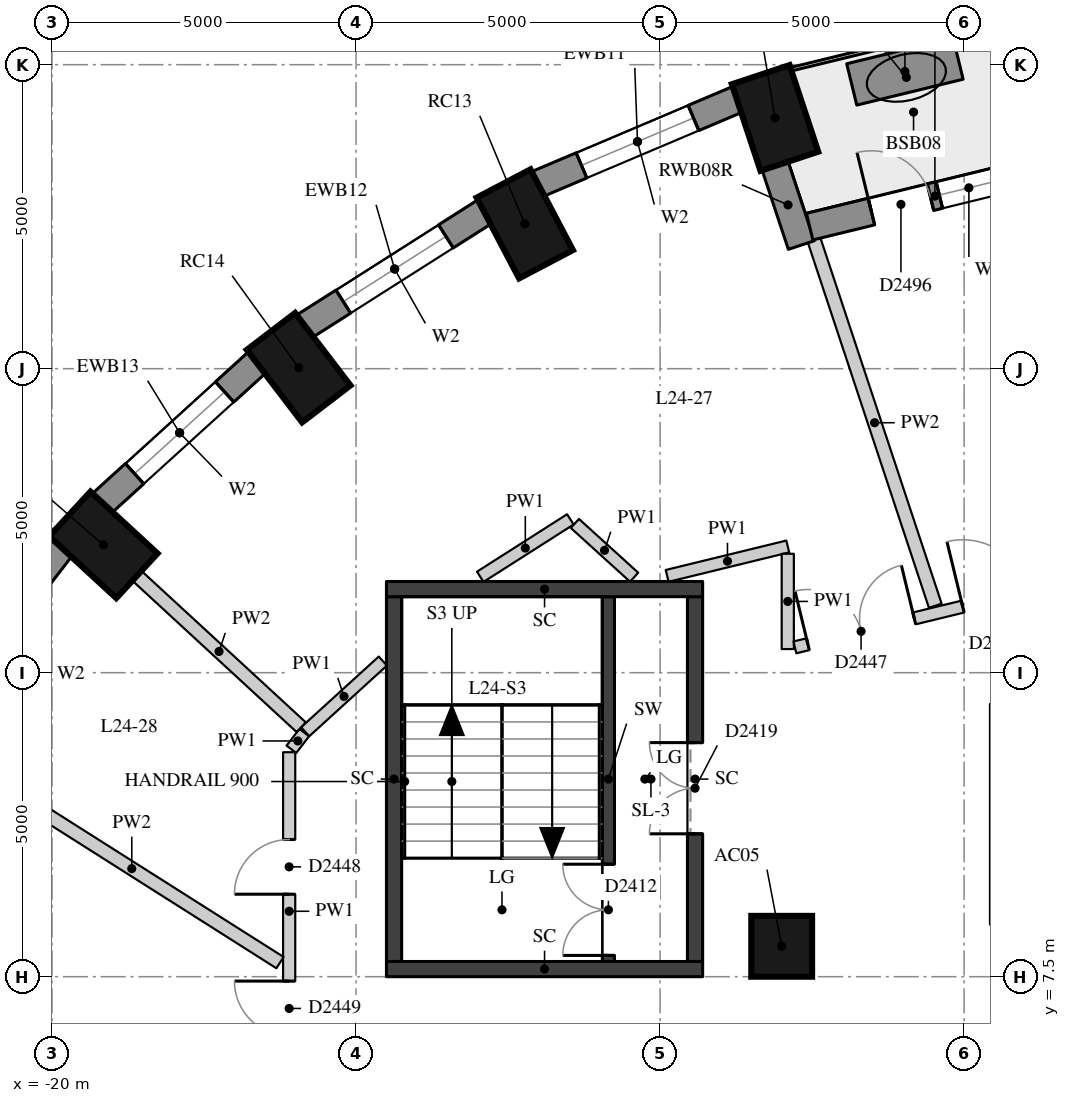
"""IFC4 building model, lengths in metres.
Left out: names, types, materials, properties, quantities, classifications, styles, units other than length and angle.
Written with IfcOpenShell. Run it as: python <this file> out.ifc"""

import sys

from ifc_helpers import new_model, si_unit, direction, frame, frame_2d, origin, origin_2d, place, context, subcontext, project, spatial, rectangle, extrude, element, fill, save


model = new_model("IFC4")
c1 = context("Model", 3, precision=1e-05, world=origin(), true_north=direction((0.0, 1.0)))
c2 = subcontext(c1, "Body", "Model", "MODEL_VIEW")
j1 = project(units=[si_unit("LENGTHUNIT", "METRE"), si_unit("PLANEANGLEUNIT", "RADIAN")], contexts=[c1])
p1 = place(None, origin())
s1 = spatial("IfcSite", under=j1, at=p1, CompositionType="ELEMENT")
p2 = place(p1, origin())
s2 = spatial("IfcBuilding", under=s1, at=p2, CompositionType="ELEMENT")
p3 = place(p2, frame((0.0, 0.0, 88.9)))
s3 = spatial("IfcBuildingStorey", under=s2, at=p3, CompositionType="ELEMENT", Elevation=88.9)
for number, where, z_axis, x_axis in (
    (1, (-8.11, 21.624, 0.0), (0.0, 0.0, 1.0), (-0.315, 0.949, 0.0)),
    (2, (-12.225, 19.882, 0.0), (0.0, 0.0, 1.0), (-0.465, 0.885, 0.0)),
    (3, (-15.945, 17.517, 0.0), (0.0, 0.0, 1.0), (-0.607, 0.795, 0.0)),
    (4, (-19.156, 14.602, 0.0), (0.0, 0.0, 1.0), (-0.735, 0.678, 0.0)),
):
    element("IfcColumn", number, at=place(p3, frame(where, z_axis=z_axis, x_axis=x_axis)), inside=s3, PredefinedType="COLUMN", context=c2, shape_type="SweptSolid", body=[
        extrude(rectangle(XDim=1.5, YDim=1.0, at=origin_2d()), origin(), (0.0, 0.0, 1.0), 3.3),
    ])
p4 = place(p3, frame((-8.0, 8.0, 0.0), z_axis=(0.0, 0.0, 1.0), x_axis=(1.0, 0.0, 0.0)))
e5 = element("IfcColumn", 5, at=p4, inside=s3, PredefinedType="COLUMN", context=c2, shape_type="SweptSolid", body=[
    extrude(rectangle(XDim=1.0, YDim=1.0, at=origin_2d()), origin(), (0.0, 0.0, 1.0), 3.3),
])
p5 = place(p3, frame((-8.718, 21.934, 0.0), z_axis=(0.0, 0.0, 1.0), x_axis=(-0.920879975612, -0.389846213932, 0.0)))
e6 = element("IfcWall", 6, at=p5, inside=s3, PredefinedType="SOLIDWALL", context=c2, shape_type="SweptSolid", body=[
    extrude(rectangle(XDim=3.592, YDim=0.45, at=frame_2d((1.796, 0.0))), origin(), (0.0, 0.0, 1.0), 3.02),
])
p6 = place(p5, frame((0.796, 0.0, 0.4)))
e7 = element("IfcOpeningElement", 7, at=p6, cuts=e6, PredefinedType="OPENING", context=c2, shape_type="SweptSolid", body=[
    extrude(rectangle(XDim=2.0, YDim=1.75, at=frame_2d((1.0, 0.875))), frame((0.0, 0.235, 0.0), z_axis=(0.0, -1.0, 0.0), x_axis=(1.0, 0.0, 0.0)), (0.0, 0.0, 1.0), 0.47),
])
p7 = place(p3, frame((-12.875, 20.087, 0.0), z_axis=(0.0, 0.0, 1.0), x_axis=(-0.843860651879, -0.536562391722, 0.0)))
e8 = element("IfcWall", 8, at=p7, inside=s3, PredefinedType="SOLIDWALL", context=c2, shape_type="SweptSolid", body=[
    extrude(rectangle(XDim=3.532, YDim=0.45, at=frame_2d((1.766, 0.0))), origin(), (0.0, 0.0, 1.0), 3.02),
])
p8 = place(p7, frame((0.766, 0.0, 0.4)))
e9 = element("IfcOpeningElement", 9, at=p8, cuts=e8, PredefinedType="OPENING", context=c2, shape_type="SweptSolid", body=[
    extrude(rectangle(XDim=2.0, YDim=1.75, at=frame_2d((1.0, 0.875))), frame((0.0, 0.235, 0.0), z_axis=(0.0, -1.0, 0.0), x_axis=(1.0, 0.0, 0.0)), (0.0, 0.0, 1.0), 0.47),
])
p9 = place(p3, frame((-16.62, 17.61, 0.0), z_axis=(0.0, 0.0, 1.0), x_axis=(-0.74032902847, -0.672244694739, 0.0)))
e10 = element("IfcWall", 10, at=p9, inside=s3, PredefinedType="SOLIDWALL", context=c2, shape_type="SweptSolid", body=[
    extrude(rectangle(XDim=3.464, YDim=0.45, at=frame_2d((1.732, 0.0))), origin(), (0.0, 0.0, 1.0), 3.02),
])
p10 = place(p9, frame((0.732, 0.0, 0.4)))
e11 = element("IfcOpeningElement", 11, at=p10, cuts=e10, PredefinedType="OPENING", context=c2, shape_type="SweptSolid", body=[
    extrude(rectangle(XDim=2.0, YDim=1.75, at=frame_2d((1.0, 0.875))), frame((0.0, 0.235, 0.0), z_axis=(0.0, -1.0, 0.0), x_axis=(1.0, 0.0, 0.0)), (0.0, 0.0, 1.0), 0.47),
])
p11 = place(p3, frame((-19.835, 14.575, 0.0), z_axis=(0.0, 0.0, 1.0), x_axis=(-0.610693945156, -0.791866721961, 0.0)))
e12 = element("IfcWall", 12, at=p11, inside=s3, PredefinedType="SOLIDWALL", context=c2, shape_type="SweptSolid", body=[
    extrude(rectangle(XDim=3.395, YDim=0.45, at=frame_2d((1.697, 0.0))), origin(), (0.0, 0.0, 1.0), 3.02),
])
p12 = place(p11, frame((0.697, 0.0, 0.4)))
e13 = element("IfcOpeningElement", 13, at=p12, cuts=e12, PredefinedType="OPENING", context=c2, shape_type="SweptSolid", body=[
    extrude(rectangle(XDim=2.0, YDim=1.75, at=frame_2d((1.0, 0.875))), frame((0.0, 0.235, 0.0), z_axis=(0.0, -1.0, 0.0), x_axis=(1.0, 0.0, 0.0)), (0.0, 0.0, 1.0), 0.47),
])
p13 = place(p3, frame((-8.114, 20.853, 0.0), z_axis=(0.0, 0.0, 1.0), x_axis=(0.314488854508, -0.949261165534, 0.0)))
e14 = element("IfcWall", 14, at=p13, inside=s3, PredefinedType="SOLIDWALL", context=c2, shape_type="SweptSolid", body=[
    extrude(rectangle(XDim=1.39, YDim=0.45, at=frame_2d((0.695, 0.0))), origin(), (0.0, 0.0, 1.0), 3.02),
])
p14 = place(p3, frame((-3.42, 20.841, 0.0), z_axis=(0.0, 0.0, 1.0), x_axis=(-0.971511611373, -0.23699195971, 0.0)))
e15 = element("IfcWall", 15, at=p14, inside=s3, PredefinedType="SOLIDWALL", context=c2, shape_type="SweptSolid", body=[
    extrude(rectangle(XDim=4.241, YDim=0.45, at=frame_2d((2.121, 0.0))), origin(), (0.0, 0.0, 1.0), 3.02),
])
p15 = place(p14, frame((1.045, 0.0, 0.4)))
e16 = element("IfcOpeningElement", 16, at=p15, cuts=e15, PredefinedType="OPENING", context=c2, shape_type="SweptSolid", body=[
    extrude(rectangle(XDim=1.0, YDim=1.75, at=frame_2d((0.5, 0.875))), frame((0.0, 0.235, 0.0), z_axis=(0.0, -1.0, 0.0), x_axis=(1.0, 0.0, 0.0)), (0.0, 0.0, 1.0), 0.47),
])
p16 = place(p14, frame((2.196, 0.0, 0.0)))
e17 = element("IfcOpeningElement", 17, at=p16, cuts=e15, PredefinedType="OPENING", context=c2, shape_type="SweptSolid", body=[
    extrude(rectangle(XDim=1.0, YDim=2.15, at=frame_2d((0.5, 1.075))), frame((0.0, 0.235, 0.0), z_axis=(0.0, -1.0, 0.0), x_axis=(1.0, 0.0, 0.0)), (0.0, 0.0, 1.0), 0.47),
])
p17 = place(p3, frame((-5.099, 22.601, 0.0), z_axis=(0.0, 0.0, 1.0), x_axis=(-0.971654974133, -0.23640349245, 0.0)))
e18 = element("IfcWall", 18, at=p17, inside=s3, PredefinedType="USERDEFINED", context=c2, shape_type="SweptSolid", body=[
    extrude(rectangle(XDim=1.8, YDim=0.7, at=frame_2d((0.9, 0.0))), origin(), (0.0, 0.0, 1.0), 0.75),
])
p18 = place(p3, frame((-10.85, 7.75, 0.0), z_axis=(0.0, 0.0, 1.0), x_axis=(0.0, 1.0, 0.0)))
e19 = element("IfcWall", 19, at=p18, inside=s3, PredefinedType="SHEAR", context=c2, shape_type="SweptSolid", body=[
    extrude(rectangle(XDim=6.0, YDim=0.2, at=frame_2d((3.0, 0.0))), origin(), (0.0, 0.0, 1.0), 3.02),
])
p19 = place(p18, frame((0.1, 0.0, 0.0)))
e20 = element("IfcOpeningElement", 20, at=p19, cuts=e19, PredefinedType="OPENING", context=c2, shape_type="SweptSolid", body=[
    extrude(rectangle(XDim=1.5, YDim=2.1, at=frame_2d((0.75, 1.05))), frame((0.0, 0.11, 0.0), z_axis=(0.0, -1.0, 0.0), x_axis=(1.0, 0.0, 0.0)), (0.0, 0.0, 1.0), 0.22),
])
p20 = place(p3, frame((-14.375, 7.75, -0.28), z_axis=(0.0, 0.0, 1.0), x_axis=(0.0, 1.0, 0.0)))
e21 = element("IfcWall", 21, at=p20, inside=s3, PredefinedType="SHEAR", context=c2, shape_type="SweptSolid", body=[
    extrude(rectangle(XDim=6.0, YDim=0.25, at=frame_2d((3.0, 0.0))), origin(), (0.0, 0.0, 1.0), 3.3),
])
p21 = place(p3, frame((-9.425, 7.75, -0.28), z_axis=(0.0, 0.0, 1.0), x_axis=(0.0, 1.0, 0.0)))
e22 = element("IfcWall", 22, at=p21, inside=s3, PredefinedType="SHEAR", context=c2, shape_type="SweptSolid", body=[
    extrude(rectangle(XDim=6.0, YDim=0.25, at=frame_2d((3.0, 0.0))), origin(), (0.0, 0.0, 1.0), 3.3),
])
p22 = place(p21, frame((2.1, 0.0, 0.28)))
e23 = element("IfcOpeningElement", 23, at=p22, cuts=e22, PredefinedType="OPENING", context=c2, shape_type="SweptSolid", body=[
    extrude(rectangle(XDim=1.5, YDim=2.1, at=frame_2d((0.75, 1.05))), frame((0.0, 0.135, 0.0), z_axis=(0.0, -1.0, 0.0), x_axis=(1.0, 0.0, 0.0)), (0.0, 0.0, 1.0), 0.27),
])
for number, where, z_axis, x_axis in (
    (24, (-14.5, 13.875, -0.28), (0.0, 0.0, 1.0), (1.0, 0.0, 0.0)),
    (25, (-14.5, 7.625, -0.28), (0.0, 0.0, 1.0), (1.0, 0.0, 0.0)),
):
    element("IfcWall", number, at=place(p3, frame(where, z_axis=z_axis, x_axis=x_axis)), inside=s3, PredefinedType="SHEAR", context=c2, shape_type="SweptSolid", body=[
        extrude(rectangle(XDim=5.2, YDim=0.25, at=frame_2d((2.6, 0.0))), origin(), (0.0, 0.0, 1.0), 3.3),
    ])
p23 = place(p3, frame((-16.1, 5.96, 0.0), z_axis=(0.0, 0.0, 1.0), x_axis=(0.0, 1.0, 0.0)))
e26 = element("IfcWall", 26, at=p23, inside=s3, PredefinedType="PARTITIONING", context=c2, shape_type="SweptSolid", body=[
    extrude(rectangle(XDim=5.232, YDim=0.2, at=frame_2d((2.616, 0.0))), origin(), (0.0, 0.0, 1.0), 3.02),
])
p24 = place(p23, frame((2.897, 0.0, 0.0)))
e27 = element("IfcOpeningElement", 27, at=p24, cuts=e26, PredefinedType="OPENING", context=c2, shape_type="SweptSolid", body=[
    extrude(rectangle(XDim=0.9, YDim=2.1, at=frame_2d((0.45, 1.05))), frame((0.0, 0.11, 0.0), z_axis=(0.0, -1.0, 0.0), x_axis=(1.0, 0.0, 0.0)), (0.0, 0.0, 1.0), 0.22),
])
p25 = place(p23, frame((0.568, 0.0, 0.0)))
e28 = element("IfcOpeningElement", 28, at=p25, cuts=e26, PredefinedType="OPENING", context=c2, shape_type="SweptSolid", body=[
    extrude(rectangle(XDim=0.9, YDim=2.1, at=frame_2d((0.45, 1.05))), frame((0.0, 0.11, 0.0), z_axis=(0.0, -1.0, 0.0), x_axis=(1.0, 0.0, 0.0)), (0.0, 0.0, 1.0), 0.22),
])
p26 = place(p3, frame((-16.063, 11.24, 0.0), z_axis=(0.0, 0.0, 1.0), x_axis=(0.609744747854, 0.792597844096, 0.0)))
e29 = element("IfcWall", 29, at=p26, inside=s3, PredefinedType="PARTITIONING", context=c2, shape_type="SweptSolid", body=[
    extrude(rectangle(XDim=0.347, YDim=0.2, at=frame_2d((0.174, 0.0))), origin(), (0.0, 0.0, 1.0), 3.02),
])
p27 = place(p3, frame((-15.837, 11.528, 0.0), z_axis=(0.0, 0.0, 1.0), x_axis=(0.739402681643, 0.673263450946, 0.0)))
e30 = element("IfcWall", 30, at=p27, inside=s3, PredefinedType="PARTITIONING", context=c2, shape_type="SweptSolid", body=[
    extrude(rectangle(XDim=1.728, YDim=0.2, at=frame_2d((0.864, 0.0))), origin(), (0.0, 0.0, 1.0), 3.02),
])
p28 = place(p3, frame((-12.957, 14.077, 0.0), z_axis=(0.0, 0.0, 1.0), x_axis=(0.843226410818, 0.537558573645, 0.0)))
e31 = element("IfcWall", 31, at=p28, inside=s3, PredefinedType="PARTITIONING", context=c2, shape_type="SweptSolid", body=[
    extrude(rectangle(XDim=1.757, YDim=0.2, at=frame_2d((0.878, 0.0))), origin(), (0.0, 0.0, 1.0), 3.02),
])
p29 = place(p3, frame((-11.401, 14.955, 0.0), z_axis=(0.0, 0.0, 1.0), x_axis=(0.740594498135, -0.671952222507, 0.0)))
e32 = element("IfcWall", 32, at=p29, inside=s3, PredefinedType="PARTITIONING", context=c2, shape_type="SweptSolid", body=[
    extrude(rectangle(XDim=1.316, YDim=0.2, at=frame_2d((0.658, 0.0))), origin(), (0.0, 0.0, 1.0), 3.02),
])
p30 = place(p3, frame((-9.884, 14.092, 0.0), z_axis=(0.0, 0.0, 1.0), x_axis=(0.971512281799, 0.236989211388, 0.0)))
e33 = element("IfcWall", 33, at=p30, inside=s3, PredefinedType="PARTITIONING", context=c2, shape_type="SweptSolid", body=[
    extrude(rectangle(XDim=2.042, YDim=0.2, at=frame_2d((1.021, 0.0))), origin(), (0.0, 0.0, 1.0), 3.02),
])
p31 = place(p3, frame((-7.9, 14.456, 0.0), z_axis=(0.0, 0.0, 1.0), x_axis=(0.0, -1.0, 0.0)))
e34 = element("IfcWall", 34, at=p31, inside=s3, PredefinedType="PARTITIONING", context=c2, shape_type="SweptSolid", body=[
    extrude(rectangle(XDim=1.567, YDim=0.2, at=frame_2d((0.784, 0.0))), origin(), (0.0, 0.0, 1.0), 3.02),
])
p32 = place(p3, frame((-7.783, 12.916, 0.0), z_axis=(0.0, 0.0, 1.0), x_axis=(0.971770455305, 0.235928341232, 0.0)))
e35 = element("IfcWall", 35, at=p32, inside=s3, PredefinedType="PARTITIONING", context=c2, shape_type="SweptSolid", body=[
    extrude(rectangle(XDim=8.832, YDim=0.2, at=frame_2d((4.416, 0.0))), origin(), (0.0, 0.0, 1.0), 2.42),
])
p33 = place(p32, frame((2.84, 0.0, 0.0)))
e36 = element("IfcOpeningElement", 36, at=p33, cuts=e35, PredefinedType="OPENING", context=c2, shape_type="SweptSolid", body=[
    extrude(rectangle(XDim=1.1, YDim=2.1, at=frame_2d((0.55, 1.05))), frame((0.0, 0.11, 0.0), z_axis=(0.0, -1.0, 0.0), x_axis=(1.0, 0.0, 0.0)), (0.0, 0.0, 1.0), 0.22),
])
p34 = place(p32, frame((0.22, 0.0, 0.0)))
e37 = element("IfcOpeningElement", 37, at=p34, cuts=e35, PredefinedType="OPENING", context=c2, shape_type="SweptSolid", body=[
    extrude(rectangle(XDim=1.8, YDim=2.1, at=frame_2d((0.9, 1.05))), frame((0.0, 0.11, 0.0), z_axis=(0.0, -1.0, 0.0), x_axis=(1.0, 0.0, 0.0)), (0.0, 0.0, 1.0), 0.22),
])
p35 = place(p3, frame((-4.5, 8.356, 0.0), z_axis=(0.0, 0.0, 1.0), x_axis=(0.0, 1.0, 0.0)))
e38 = element("IfcWall", 38, at=p35, inside=s3, PredefinedType="PARTITIONING", context=c2, shape_type="SweptSolid", body=[
    extrude(rectangle(XDim=3.631, YDim=0.15, at=frame_2d((1.815, 0.0))), origin(), (0.0, 0.0, 1.0), 3.02),
])
p36 = place(p3, frame((-7.469, 19.622, 0.0), z_axis=(0.0, 0.0, 1.0), x_axis=(0.314576080141, -0.94923226336, 0.0)))
e39 = element("IfcWall", 39, at=p36, inside=s3, PredefinedType="PARTITIONING", context=c2, shape_type="SweptSolid", body=[
    extrude(rectangle(XDim=6.343, YDim=0.22, at=frame_2d((3.171, 0.0))), origin(), (0.0, 0.0, 1.0), 3.02),
])
p37 = place(p3, frame((-18.604, 14.094, 0.0), z_axis=(0.0, 0.0, 1.0), x_axis=(0.73529495628, -0.677747244383, 0.0)))
e40 = element("IfcWall", 40, at=p37, inside=s3, PredefinedType="PARTITIONING", context=c2, shape_type="SweptSolid", body=[
    extrude(rectangle(XDim=3.674, YDim=0.22, at=frame_2d((1.837, 0.0))), origin(), (0.0, 0.0, 1.0), 3.02),
])
p38 = place(p3, frame((-21.126, 10.823, 0.0), z_axis=(0.0, 0.0, 1.0), x_axis=(0.844518840625, -0.535525842355, 0.0)))
e41 = element("IfcWall", 41, at=p38, inside=s3, PredefinedType="PARTITIONING", context=c2, shape_type="SweptSolid", body=[
    extrude(rectangle(XDim=5.773, YDim=0.22, at=frame_2d((2.887, 0.0))), origin(), (0.0, 0.0, 1.0), 3.02),
])
p39 = place(p6, origin())
e42 = element("IfcWindow", 42, at=p39, inside=s3, PartitioningType="SINGLE_PANEL", PredefinedType="WINDOW", context=c2, shape_type="SweptSolid", body=[
    extrude(rectangle(XDim=2.0, YDim=1.75, at=frame_2d((1.0, 0.875))), frame((0.0, 0.035, 0.0), z_axis=(0.0, -1.0, 0.0), x_axis=(1.0, 0.0, 0.0)), (0.0, 0.0, 1.0), 0.06),
])
fill(e7, e42)
p40 = place(p8, origin())
e43 = element("IfcWindow", 43, at=p40, inside=s3, PartitioningType="SINGLE_PANEL", PredefinedType="WINDOW", context=c2, shape_type="SweptSolid", body=[
    extrude(rectangle(XDim=2.0, YDim=1.75, at=frame_2d((1.0, 0.875))), frame((0.0, 0.035, 0.0), z_axis=(0.0, -1.0, 0.0), x_axis=(1.0, 0.0, 0.0)), (0.0, 0.0, 1.0), 0.06),
])
fill(e9, e43)
p41 = place(p10, origin())
e44 = element("IfcWindow", 44, at=p41, inside=s3, PartitioningType="SINGLE_PANEL", PredefinedType="WINDOW", context=c2, shape_type="SweptSolid", body=[
    extrude(rectangle(XDim=2.0, YDim=1.75, at=frame_2d((1.0, 0.875))), frame((0.0, 0.035, 0.0), z_axis=(0.0, -1.0, 0.0), x_axis=(1.0, 0.0, 0.0)), (0.0, 0.0, 1.0), 0.06),
])
fill(e11, e44)
p42 = place(p15, origin())
e45 = element("IfcWindow", 45, at=p42, inside=s3, PartitioningType="SINGLE_PANEL", PredefinedType="WINDOW", context=c2, shape_type="SweptSolid", body=[
    extrude(rectangle(XDim=1.0, YDim=1.75, at=frame_2d((0.5, 0.875))), frame((0.0, 0.035, 0.0), z_axis=(0.0, -1.0, 0.0), x_axis=(1.0, 0.0, 0.0)), (0.0, 0.0, 1.0), 0.06),
])
fill(e16, e45)
p43 = place(p16, frame((1.0, 0.0, 0.0), z_axis=(0.0, 0.0, 1.0), x_axis=(-1.0, 0.0, 0.0)))
e46 = element("IfcDoor", 46, at=p43, inside=s3, OperationType="SINGLE_SWING_LEFT", PredefinedType="DOOR", context=c2, shape_type="SweptSolid", body=[
    extrude(rectangle(XDim=1.0, YDim=2.15, at=frame_2d((0.5, 1.075))), frame((0.0, 0.075, 0.0), z_axis=(0.0, -1.0, 0.0), x_axis=(1.0, 0.0, 0.0)), (0.0, 0.0, 1.0), 0.05),
])
fill(e17, e46)
p44 = place(p19, origin())
e47 = element("IfcDoor", 47, at=p44, inside=s3, OperationType="DOUBLE_DOOR_SINGLE_SWING", PredefinedType="DOOR", context=c2, shape_type="SweptSolid", body=[
    extrude(rectangle(XDim=1.5, YDim=2.1, at=frame_2d((0.75, 1.05))), frame((0.0, 0.025, 0.0), z_axis=(0.0, -1.0, 0.0), x_axis=(1.0, 0.0, 0.0)), (0.0, 0.0, 1.0), 0.05),
])
fill(e20, e47)
p45 = place(p22, origin())
e48 = element("IfcDoor", 48, at=p45, inside=s3, OperationType="DOUBLE_DOOR_SINGLE_SWING", PredefinedType="DOOR", context=c2, shape_type="SweptSolid", body=[
    extrude(rectangle(XDim=1.5, YDim=2.1, at=frame_2d((0.75, 1.05))), frame((0.0, 0.025, 0.0), z_axis=(0.0, -1.0, 0.0), x_axis=(1.0, 0.0, 0.0)), (0.0, 0.0, 1.0), 0.05),
])
fill(e23, e48)
p46 = place(p33, origin())
e49 = element("IfcDoor", 49, at=p46, inside=s3, OperationType="SINGLE_SWING_LEFT", PredefinedType="DOOR", context=c2, shape_type="SweptSolid", body=[
    extrude(rectangle(XDim=1.1, YDim=2.1, at=frame_2d((0.55, 1.05))), frame((0.0, 0.025, 0.0), z_axis=(0.0, -1.0, 0.0), x_axis=(1.0, 0.0, 0.0)), (0.0, 0.0, 1.0), 0.05),
])
fill(e36, e49)
p47 = place(p34, origin())
e50 = element("IfcDoor", 50, at=p47, inside=s3, OperationType="DOUBLE_DOOR_SINGLE_SWING", PredefinedType="DOOR", context=c2, shape_type="SweptSolid", body=[
    extrude(rectangle(XDim=1.8, YDim=2.1, at=frame_2d((0.9, 1.05))), frame((0.0, 0.025, 0.0), z_axis=(0.0, -1.0, 0.0), x_axis=(1.0, 0.0, 0.0)), (0.0, 0.0, 1.0), 0.05),
])
fill(e37, e50)
p48 = place(p24, origin())
e51 = element("IfcDoor", 51, at=p48, inside=s3, OperationType="SINGLE_SWING_LEFT", PredefinedType="DOOR", context=c2, shape_type="SweptSolid", body=[
    extrude(rectangle(XDim=0.9, YDim=2.1, at=frame_2d((0.45, 1.05))), frame((0.0, 0.025, 0.0), z_axis=(0.0, -1.0, 0.0), x_axis=(1.0, 0.0, 0.0)), (0.0, 0.0, 1.0), 0.05),
])
fill(e27, e51)
p49 = place(p25, origin())
e52 = element("IfcDoor", 52, at=p49, inside=s3, OperationType="SINGLE_SWING_RIGHT", PredefinedType="DOOR", context=c2, shape_type="SweptSolid", body=[
    extrude(rectangle(XDim=0.9, YDim=2.1, at=frame_2d((0.45, 1.05))), frame((0.0, 0.025, 0.0), z_axis=(0.0, -1.0, 0.0), x_axis=(1.0, 0.0, 0.0)), (0.0, 0.0, 1.0), 0.05),
])
fill(e28, e52)
save(model, sys.argv[1])
